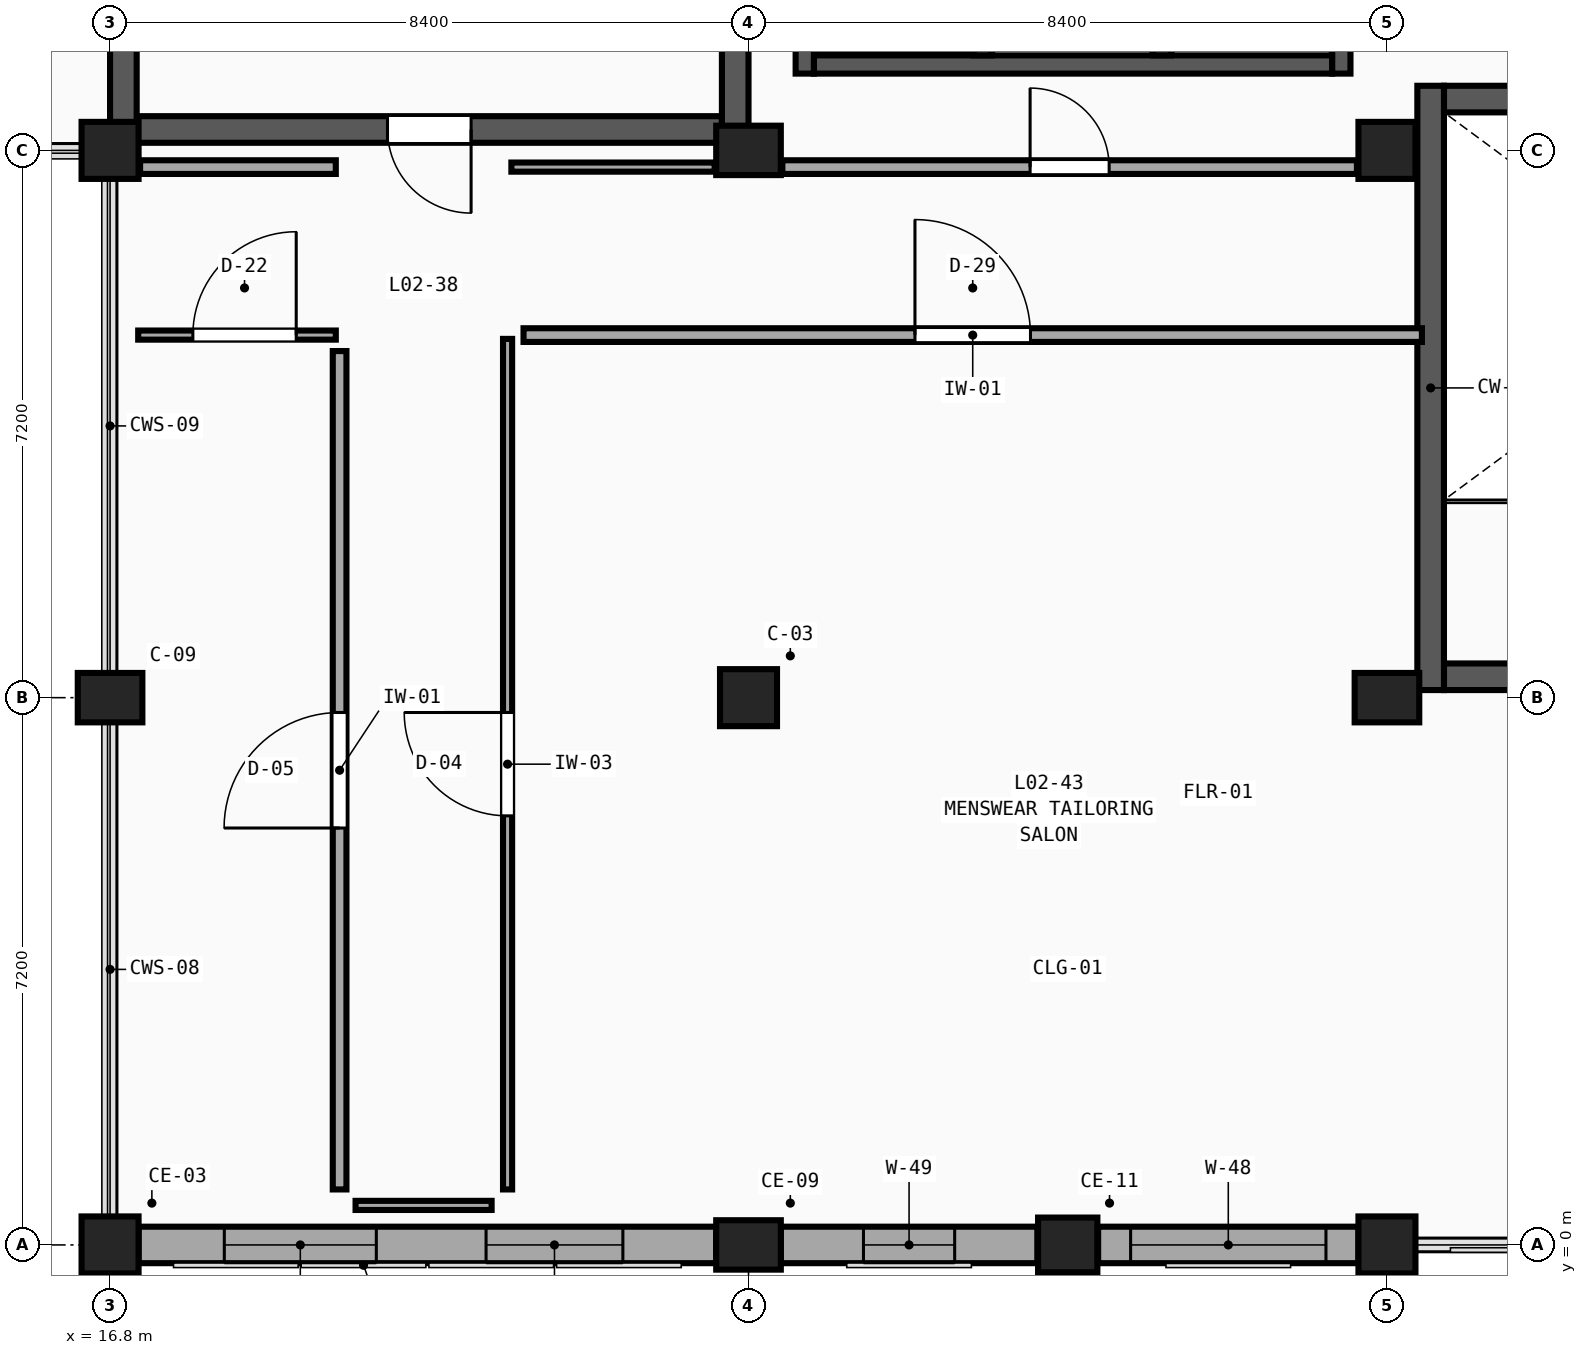
"""IFC4 building model, lengths in metres.
Left out: names, types, materials, properties, quantities, classifications, styles, units other than length and angle.
Written with IfcOpenShell. Run it as: python <this file> out.ifc"""

import sys

from ifc_helpers import new_model, si_unit, direction, frame, frame_2d, origin, origin_2d, place, context, subcontext, project, spatial, rectangle, extrude, element, fill, save


model = new_model("IFC4")
c1 = context("Model", 3, precision=1e-05, world=origin(), true_north=direction((0.0, 1.0)))
c2 = subcontext(c1, "Body", "Model", "MODEL_VIEW")
j1 = project(units=[si_unit("LENGTHUNIT", "METRE"), si_unit("PLANEANGLEUNIT", "RADIAN")], contexts=[c1])
p1 = place(None, origin())
s1 = spatial("IfcSite", under=j1, at=p1, CompositionType="ELEMENT")
p2 = place(p1, origin())
s2 = spatial("IfcBuilding", under=s1, at=p2, CompositionType="ELEMENT")
p3 = place(p2, frame((0.0, 0.0, 9.9)))
s3 = spatial("IfcBuildingStorey", under=s2, at=p3, CompositionType="ELEMENT", Elevation=9.9)
p4 = place(p3, frame((16.8, 0.0, 0.0), z_axis=(0.0, 0.0, 1.0), x_axis=(1.0, 0.0, 0.0)))
e1 = element("IfcColumn", 1, at=p4, inside=s3, PredefinedType="COLUMN", context=c2, shape_type="SweptSolid", body=[
    extrude(rectangle(XDim=0.75, YDim=0.75, at=origin_2d()), origin(), (0.0, 0.0, 1.0), 4.5),
])
p5 = place(p3, frame((16.8, 7.2, 0.0), z_axis=(0.0, 0.0, 1.0), x_axis=(1.0, 0.0, 0.0)))
e2 = element("IfcColumn", 2, at=p5, inside=s3, PredefinedType="COLUMN", context=c2, shape_type="SweptSolid", body=[
    extrude(rectangle(XDim=0.85, YDim=0.65, at=origin_2d()), origin(), (0.0, 0.0, 1.0), 4.5),
])
p6 = place(p3, frame((16.8, 14.4, 0.0), z_axis=(0.0, 0.0, 1.0), x_axis=(1.0, 0.0, 0.0)))
e3 = element("IfcColumn", 3, at=p6, inside=s3, PredefinedType="COLUMN", context=c2, shape_type="SweptSolid", body=[
    extrude(rectangle(XDim=0.75, YDim=0.75, at=origin_2d()), origin(), (0.0, 0.0, 1.0), 4.5),
])
p7 = place(p3, frame((25.2, 0.0, 0.0), z_axis=(0.0, 0.0, 1.0), x_axis=(1.0, 0.0, 0.0)))
e4 = element("IfcColumn", 4, at=p7, inside=s3, PredefinedType="COLUMN", context=c2, shape_type="SweptSolid", body=[
    extrude(rectangle(XDim=0.85, YDim=0.65, at=origin_2d()), origin(), (0.0, 0.0, 1.0), 4.5),
])
p8 = place(p3, frame((25.2, 7.2, 0.0), z_axis=(0.0, 0.0, 1.0), x_axis=(1.0, 0.0, 0.0)))
e5 = element("IfcColumn", 5, at=p8, inside=s3, PredefinedType="COLUMN", context=c2, shape_type="SweptSolid", body=[
    extrude(rectangle(XDim=0.75, YDim=0.75, at=origin_2d()), origin(), (0.0, 0.0, 1.0), 4.5),
])
p9 = place(p3, frame((25.2, 14.4, 0.0), z_axis=(0.0, 0.0, 1.0), x_axis=(1.0, 0.0, 0.0)))
e6 = element("IfcColumn", 6, at=p9, inside=s3, PredefinedType="COLUMN", context=c2, shape_type="SweptSolid", body=[
    extrude(rectangle(XDim=0.85, YDim=0.65, at=origin_2d()), origin(), (0.0, 0.0, 1.0), 4.5),
])
p10 = place(p3, frame((33.6, 0.0, 0.0), z_axis=(0.0, 0.0, 1.0), x_axis=(1.0, 0.0, 0.0)))
e7 = element("IfcColumn", 7, at=p10, inside=s3, PredefinedType="COLUMN", context=c2, shape_type="SweptSolid", body=[
    extrude(rectangle(XDim=0.75, YDim=0.75, at=origin_2d()), origin(), (0.0, 0.0, 1.0), 4.5),
])
p11 = place(p3, frame((33.6, 7.2, 0.0), z_axis=(0.0, 0.0, 1.0), x_axis=(1.0, 0.0, 0.0)))
e8 = element("IfcColumn", 8, at=p11, inside=s3, PredefinedType="COLUMN", context=c2, shape_type="SweptSolid", body=[
    extrude(rectangle(XDim=0.85, YDim=0.65, at=origin_2d()), origin(), (0.0, 0.0, 1.0), 4.5),
])
p12 = place(p3, frame((33.6, 14.4, 0.0), z_axis=(0.0, 0.0, 1.0), x_axis=(1.0, 0.0, 0.0)))
e9 = element("IfcColumn", 9, at=p12, inside=s3, PredefinedType="COLUMN", context=c2, shape_type="SweptSolid", body=[
    extrude(rectangle(XDim=0.75, YDim=0.75, at=origin_2d()), origin(), (0.0, 0.0, 1.0), 4.5),
])
p13 = place(p3, frame((29.4, 0.0, 0.0), z_axis=(0.0, 0.0, 1.0), x_axis=(1.0, 0.0, 0.0)))
e10 = element("IfcColumn", 10, at=p13, inside=s3, PredefinedType="PILASTER", context=c2, shape_type="SweptSolid", body=[
    extrude(rectangle(XDim=0.78, YDim=0.72, at=origin_2d()), origin(), (0.0, 0.0, 1.0), 4.5),
])
p14 = place(p3, frame((24.775, 0.0, 0.0), z_axis=(0.0, 0.0, 1.0), x_axis=(-1.0, 0.0, 0.0)))
e11 = element("IfcWall", 11, at=p14, inside=s3, PredefinedType="SOLIDWALL", context=c2, shape_type="SweptSolid", body=[
    extrude(rectangle(XDim=7.6, YDim=0.48, at=frame_2d((3.8, 0.0))), origin(), (0.0, 0.0, 1.0), 3.63),
])
p15 = place(p14, frame((1.228, 0.0, 0.75)))
e12 = element("IfcOpeningElement", 12, at=p15, cuts=e11, PredefinedType="OPENING", context=c2, shape_type="SweptSolid", body=[
    extrude(rectangle(XDim=1.8, YDim=2.73, at=frame_2d((0.9, 1.365))), frame((0.0, 0.26, 0.0), z_axis=(0.0, -1.0, 0.0), x_axis=(1.0, 0.0, 0.0)), (0.0, 0.0, 1.0), 0.52),
])
p16 = place(p14, frame((4.472, 0.0, 0.75)))
e13 = element("IfcOpeningElement", 13, at=p16, cuts=e11, PredefinedType="OPENING", context=c2, shape_type="SweptSolid", body=[
    extrude(rectangle(XDim=2.0, YDim=2.73, at=frame_2d((1.0, 1.365))), frame((0.0, 0.26, 0.0), z_axis=(0.0, -1.0, 0.0), x_axis=(1.0, 0.0, 0.0)), (0.0, 0.0, 1.0), 0.52),
])
p17 = place(p3, frame((33.225, 0.0, 0.0), z_axis=(0.0, 0.0, 1.0), x_axis=(-1.0, 0.0, 0.0)))
e14 = element("IfcWall", 14, at=p17, inside=s3, PredefinedType="SOLIDWALL", context=c2, shape_type="SweptSolid", body=[
    extrude(rectangle(XDim=3.425, YDim=0.48, at=frame_2d((1.712, 0.0))), origin(), (0.0, 0.0, 1.0), 3.63),
])
p18 = place(p17, frame((0.427, 0.0, 0.75)))
e15 = element("IfcOpeningElement", 15, at=p18, cuts=e14, PredefinedType="OPENING", context=c2, shape_type="SweptSolid", body=[
    extrude(rectangle(XDim=2.57, YDim=2.73, at=frame_2d((1.285, 1.365))), frame((0.0, 0.26, 0.0), z_axis=(0.0, -1.0, 0.0), x_axis=(1.0, 0.0, 0.0)), (0.0, 0.0, 1.0), 0.52),
])
p19 = place(p3, frame((29.0, 0.0, 0.0), z_axis=(0.0, 0.0, 1.0), x_axis=(-1.0, 0.0, 0.0)))
e16 = element("IfcWall", 16, at=p19, inside=s3, PredefinedType="SOLIDWALL", context=c2, shape_type="SweptSolid", body=[
    extrude(rectangle(XDim=3.375, YDim=0.48, at=frame_2d((1.688, 0.0))), origin(), (0.0, 0.0, 1.0), 3.63),
])
p20 = place(p19, frame((1.087, 0.0, 0.75)))
e17 = element("IfcOpeningElement", 17, at=p20, cuts=e16, PredefinedType="OPENING", context=c2, shape_type="SweptSolid", body=[
    extrude(rectangle(XDim=1.2, YDim=2.73, at=frame_2d((0.6, 1.365))), frame((0.0, 0.26, 0.0), z_axis=(0.0, -1.0, 0.0), x_axis=(1.0, 0.0, 0.0)), (0.0, 0.0, 1.0), 0.52),
])
p21 = place(p3, frame((24.85, 14.675, 0.0), z_axis=(0.0, 0.0, 1.0), x_axis=(-1.0, 0.0, 0.0)))
e18 = element("IfcWall", 18, at=p21, inside=s3, PredefinedType="SHEAR", context=c2, shape_type="SweptSolid", body=[
    extrude(rectangle(XDim=7.7, YDim=0.35, at=frame_2d((3.85, 0.0))), origin(), (0.0, 0.0, 1.0), 4.5),
])
p22 = place(p21, frame((3.3, 0.0, 0.0)))
e19 = element("IfcOpeningElement", 19, at=p22, cuts=e18, PredefinedType="OPENING", context=c2, shape_type="SweptSolid", body=[
    extrude(rectangle(XDim=1.1, YDim=2.2, at=frame_2d((0.55, 1.1))), frame((0.0, 0.195, 0.0), z_axis=(0.0, -1.0, 0.0), x_axis=(1.0, 0.0, 0.0)), (0.0, 0.0, 1.0), 0.39),
])
for number, where, z_axis, x_axis in (
    (20, (16.975, 22.85, 0.0), (0.0, 0.0, 1.0), (0.0, -1.0, 0.0)),
    (21, (25.025, 14.5, 0.0), (0.0, 0.0, 1.0), (0.0, 1.0, 0.0)),
):
    element("IfcWall", number, at=place(p3, frame(where, z_axis=z_axis, x_axis=x_axis)), inside=s3, PredefinedType="SHEAR", context=c2, shape_type="SweptSolid", body=[
        extrude(rectangle(XDim=8.35, YDim=0.35, at=frame_2d((4.175, 0.0))), origin(), (0.0, 0.0, 1.0), 4.5),
    ])
p23 = place(p3, frame((41.25, 7.475, 0.0), z_axis=(0.0, 0.0, 1.0), x_axis=(-1.0, 0.0, 0.0)))
e22 = element("IfcWall", 22, at=p23, inside=s3, PredefinedType="SHEAR", context=c2, shape_type="SweptSolid", body=[
    extrude(rectangle(XDim=6.9, YDim=0.35, at=frame_2d((3.45, 0.0))), origin(), (0.0, 0.0, 1.0), 4.5),
])
p24 = place(p23, frame((2.9, 0.0, 0.0)))
e23 = element("IfcOpeningElement", 23, at=p24, cuts=e22, PredefinedType="OPENING", context=c2, shape_type="SweptSolid", body=[
    extrude(rectangle(XDim=1.1, YDim=2.2, at=frame_2d((0.55, 1.1))), frame((0.0, 0.195, 0.0), z_axis=(0.0, -1.0, 0.0), x_axis=(1.0, 0.0, 0.0)), (0.0, 0.0, 1.0), 0.39),
])
p25 = place(p3, frame((34.35, 15.075, 0.0), z_axis=(0.0, 0.0, 1.0), x_axis=(1.0, 0.0, 0.0)))
e24 = element("IfcWall", 24, at=p25, inside=s3, PredefinedType="SHEAR", context=c2, shape_type="SweptSolid", body=[
    extrude(rectangle(XDim=6.9, YDim=0.35, at=frame_2d((3.45, 0.0))), origin(), (0.0, 0.0, 1.0), 4.5),
])
p26 = place(p3, frame((34.175, 15.25, 0.0), z_axis=(0.0, 0.0, 1.0), x_axis=(0.0, -1.0, 0.0)))
e25 = element("IfcWall", 25, at=p26, inside=s3, PredefinedType="SHEAR", context=c2, shape_type="SweptSolid", body=[
    extrude(rectangle(XDim=7.95, YDim=0.35, at=frame_2d((3.975, 0.0))), origin(), (0.0, 0.0, 1.0), 4.5),
])
p27 = place(p3, frame((26.06, 15.53, 0.0), z_axis=(0.0, 0.0, 1.0), x_axis=(1.0, 0.0, 0.0)))
e26 = element("IfcWall", 26, at=p27, inside=s3, PredefinedType="SHEAR", context=c2, shape_type="SweptSolid", body=[
    extrude(rectangle(XDim=6.82, YDim=0.24, at=frame_2d((3.41, 0.0))), origin(), (0.0, 0.0, 1.0), 4.18),
])
for number, where, z_axis, x_axis in (
    (27, (25.94, 18.39, 0.0), (0.0, 0.0, 1.0), (0.0, -1.0, 0.0)),
    (28, (33.0, 15.41, 0.0), (0.0, 0.0, 1.0), (0.0, 1.0, 0.0)),
):
    element("IfcWall", number, at=place(p3, frame(where, z_axis=z_axis, x_axis=x_axis)), inside=s3, PredefinedType="SHEAR", context=c2, shape_type="SweptSolid", body=[
        extrude(rectangle(XDim=2.98, YDim=0.24, at=frame_2d((1.49, 0.0))), origin(), (0.0, 0.0, 1.0), 4.18),
    ])
for number, where, z_axis, x_axis in (
    (29, (28.28, 15.65, 0.0), (0.0, 0.0, 1.0), (0.0, 1.0, 0.0)),
    (30, (30.64, 15.65, 0.0), (0.0, 0.0, 1.0), (0.0, 1.0, 0.0)),
):
    element("IfcWall", number, at=place(p3, frame(where, z_axis=z_axis, x_axis=x_axis)), inside=s3, PredefinedType="SHEAR", context=c2, shape_type="SweptSolid", body=[
        extrude(rectangle(XDim=2.5, YDim=0.24, at=frame_2d((1.25, 0.0))), origin(), (0.0, 0.0, 1.0), 4.18),
    ])
p28 = place(p3, frame((22.08, 14.18, 0.0), z_axis=(0.0, 0.0, 1.0), x_axis=(1.0, 0.0, 0.0)))
e31 = element("IfcWall", 31, at=p28, inside=s3, PredefinedType="PARTITIONING", context=c2, shape_type="SweptSolid", body=[
    extrude(rectangle(XDim=2.675, YDim=0.12, at=frame_2d((1.337, 0.0))), origin(), (0.0, 0.0, 1.0), 3.73),
])
p29 = place(p3, frame((25.645, 14.18, 0.0), z_axis=(0.0, 0.0, 1.0), x_axis=(1.0, 0.0, 0.0)))
e32 = element("IfcWall", 32, at=p29, inside=s3, PredefinedType="PARTITIONING", context=c2, shape_type="SweptSolid", body=[
    extrude(rectangle(XDim=7.56, YDim=0.18, at=frame_2d((3.78, 0.0))), origin(), (0.0, 0.0, 1.0), 3.73),
])
p30 = place(p29, frame((3.26, 0.0, 0.0)))
e33 = element("IfcOpeningElement", 33, at=p30, cuts=e32, PredefinedType="OPENING", context=c2, shape_type="SweptSolid", body=[
    extrude(rectangle(XDim=1.04, YDim=2.37, at=frame_2d((0.52, 1.185))), frame((0.0, 0.11, 0.0), z_axis=(0.0, -1.0, 0.0), x_axis=(1.0, 0.0, 0.0)), (0.0, 0.0, 1.0), 0.22),
])
p31 = place(p3, frame((22.24, 11.97, 0.0), z_axis=(0.0, 0.0, 1.0), x_axis=(1.0, 0.0, 0.0)))
e34 = element("IfcWall", 34, at=p31, inside=s3, PredefinedType="PARTITIONING", context=c2, shape_type="SweptSolid", body=[
    extrude(rectangle(XDim=11.82, YDim=0.18, at=frame_2d((5.91, 0.0))), origin(), (0.0, 0.0, 1.0), 4.18),
])
p32 = place(p31, frame((5.15, 0.0, 0.0)))
e35 = element("IfcOpeningElement", 35, at=p32, cuts=e34, PredefinedType="OPENING", context=c2, shape_type="SweptSolid", body=[
    extrude(rectangle(XDim=1.52, YDim=2.37, at=frame_2d((0.76, 1.185))), frame((0.0, 0.11, 0.0), z_axis=(0.0, -1.0, 0.0), x_axis=(1.0, 0.0, 0.0)), (0.0, 0.0, 1.0), 0.22),
])
p33 = place(p3, frame((22.03, 0.73, 0.0), z_axis=(0.0, 0.0, 1.0), x_axis=(0.0, 1.0, 0.0)))
e36 = element("IfcWall", 36, at=p33, inside=s3, PredefinedType="PARTITIONING", context=c2, shape_type="SweptSolid", body=[
    extrude(rectangle(XDim=11.19, YDim=0.12, at=frame_2d((5.595, 0.0))), origin(), (0.0, 0.0, 1.0), 4.18),
])
p34 = place(p33, frame((4.915, 0.0, 0.0)))
e37 = element("IfcOpeningElement", 37, at=p34, cuts=e36, PredefinedType="OPENING", context=c2, shape_type="SweptSolid", body=[
    extrude(rectangle(XDim=1.36, YDim=2.05, at=frame_2d((0.68, 1.025))), frame((0.0, 0.08, 0.0), z_axis=(0.0, -1.0, 0.0), x_axis=(1.0, 0.0, 0.0)), (0.0, 0.0, 1.0), 0.16),
])
p35 = place(p3, frame((19.82, 0.73, 0.0), z_axis=(0.0, 0.0, 1.0), x_axis=(0.0, 1.0, 0.0)))
e38 = element("IfcWall", 38, at=p35, inside=s3, PredefinedType="PARTITIONING", context=c2, shape_type="SweptSolid", body=[
    extrude(rectangle(XDim=11.03, YDim=0.18, at=frame_2d((5.515, 0.0))), origin(), (0.0, 0.0, 1.0), 4.18),
])
p36 = place(p35, frame((4.755, 0.0, 0.0)))
e39 = element("IfcOpeningElement", 39, at=p36, cuts=e38, PredefinedType="OPENING", context=c2, shape_type="SweptSolid", body=[
    extrude(rectangle(XDim=1.52, YDim=2.05, at=frame_2d((0.76, 1.025))), frame((0.0, 0.11, 0.0), z_axis=(0.0, -1.0, 0.0), x_axis=(1.0, 0.0, 0.0)), (0.0, 0.0, 1.0), 0.22),
])
p37 = place(p3, frame((17.17, 11.97, 0.0), z_axis=(0.0, 0.0, 1.0), x_axis=(1.0, 0.0, 0.0)))
e40 = element("IfcWall", 40, at=p37, inside=s3, PredefinedType="PARTITIONING", context=c2, shape_type="SweptSolid", body=[
    extrude(rectangle(XDim=2.6, YDim=0.12, at=frame_2d((1.3, 0.0))), origin(), (0.0, 0.0, 1.0), 4.18),
])
p38 = place(p37, frame((0.719, 0.0, 0.0)))
e41 = element("IfcOpeningElement", 41, at=p38, cuts=e40, PredefinedType="OPENING", context=c2, shape_type="SweptSolid", body=[
    extrude(rectangle(XDim=1.36, YDim=2.29, at=frame_2d((0.68, 1.145))), frame((0.0, 0.08, 0.0), z_axis=(0.0, -1.0, 0.0), x_axis=(1.0, 0.0, 0.0)), (0.0, 0.0, 1.0), 0.16),
])
p39 = place(p3, frame((17.195, 14.18, 0.0), z_axis=(0.0, 0.0, 1.0), x_axis=(1.0, 0.0, 0.0)))
e42 = element("IfcWall", 42, at=p39, inside=s3, PredefinedType="PARTITIONING", context=c2, shape_type="SweptSolid", body=[
    extrude(rectangle(XDim=2.575, YDim=0.18, at=frame_2d((1.288, 0.0))), origin(), (0.0, 0.0, 1.0), 3.73),
])
p40 = place(p3, frame((20.03, 0.52, 0.0), z_axis=(0.0, 0.0, 1.0), x_axis=(1.0, 0.0, 0.0)))
e43 = element("IfcWall", 43, at=p40, inside=s3, PredefinedType="PARTITIONING", context=c2, shape_type="SweptSolid", body=[
    extrude(rectangle(XDim=1.79, YDim=0.12, at=frame_2d((0.895, 0.0))), origin(), (0.0, 0.0, 1.0), 3.63),
])
p41 = place(p15, origin())
e44 = element("IfcWindow", 44, at=p41, inside=s3, PartitioningType="DOUBLE_PANEL_VERTICAL", PredefinedType="WINDOW", context=c2, shape_type="SweptSolid", body=[
    extrude(rectangle(XDim=1.8, YDim=2.73, at=frame_2d((0.9, 1.365))), frame((0.0, 0.03, 0.0), z_axis=(0.0, -1.0, 0.0), x_axis=(1.0, 0.0, 0.0)), (0.0, 0.0, 1.0), 0.06),
])
fill(e12, e44)
p42 = place(p16, origin())
e45 = element("IfcWindow", 45, at=p42, inside=s3, PartitioningType="TRIPLE_PANEL_VERTICAL", PredefinedType="WINDOW", context=c2, shape_type="SweptSolid", body=[
    extrude(rectangle(XDim=2.0, YDim=2.73, at=frame_2d((1.0, 1.365))), frame((0.0, 0.03, 0.0), z_axis=(0.0, -1.0, 0.0), x_axis=(1.0, 0.0, 0.0)), (0.0, 0.0, 1.0), 0.06),
])
fill(e13, e45)
p43 = place(p18, origin())
e46 = element("IfcWindow", 46, at=p43, inside=s3, PartitioningType="TRIPLE_PANEL_VERTICAL", PredefinedType="WINDOW", context=c2, shape_type="SweptSolid", body=[
    extrude(rectangle(XDim=2.57, YDim=2.73, at=frame_2d((1.285, 1.365))), frame((0.0, 0.03, 0.0), z_axis=(0.0, -1.0, 0.0), x_axis=(1.0, 0.0, 0.0)), (0.0, 0.0, 1.0), 0.06),
])
fill(e15, e46)
p44 = place(p20, origin())
e47 = element("IfcWindow", 47, at=p44, inside=s3, PartitioningType="SINGLE_PANEL", PredefinedType="WINDOW", context=c2, shape_type="SweptSolid", body=[
    extrude(rectangle(XDim=1.2, YDim=2.73, at=frame_2d((0.6, 1.365))), frame((0.0, 0.03, 0.0), z_axis=(0.0, -1.0, 0.0), x_axis=(1.0, 0.0, 0.0)), (0.0, 0.0, 1.0), 0.06),
])
fill(e17, e47)
p45 = place(p22, origin())
e48 = element("IfcDoor", 48, at=p45, inside=s3, OperationType="SINGLE_SWING_LEFT", PredefinedType="DOOR", context=c2, shape_type="SweptSolid", body=[
    extrude(rectangle(XDim=1.1, YDim=2.2, at=frame_2d((0.55, 1.1))), frame((0.0, 0.025, 0.0), z_axis=(0.0, -1.0, 0.0), x_axis=(1.0, 0.0, 0.0)), (0.0, 0.0, 1.0), 0.05),
])
fill(e19, e48)
p46 = place(p30, origin())
e49 = element("IfcDoor", 49, at=p46, inside=s3, OperationType="SINGLE_SWING_LEFT", PredefinedType="DOOR", context=c2, shape_type="SweptSolid", body=[
    extrude(rectangle(XDim=1.04, YDim=2.37, at=frame_2d((0.52, 1.185))), frame((0.0, 0.025, 0.0), z_axis=(0.0, -1.0, 0.0), x_axis=(1.0, 0.0, 0.0)), (0.0, 0.0, 1.0), 0.05),
])
fill(e33, e49)
p47 = place(p32, origin())
e50 = element("IfcDoor", 50, at=p47, inside=s3, OperationType="SINGLE_SWING_LEFT", PredefinedType="DOOR", context=c2, shape_type="SweptSolid", body=[
    extrude(rectangle(XDim=1.52, YDim=2.37, at=frame_2d((0.76, 1.185))), frame((0.0, 0.025, 0.0), z_axis=(0.0, -1.0, 0.0), x_axis=(1.0, 0.0, 0.0)), (0.0, 0.0, 1.0), 0.05),
])
fill(e35, e50)
p48 = place(p34, origin())
e51 = element("IfcDoor", 51, at=p48, inside=s3, OperationType="SINGLE_SWING_RIGHT", PredefinedType="DOOR", context=c2, shape_type="SweptSolid", body=[
    extrude(rectangle(XDim=1.36, YDim=2.05, at=frame_2d((0.68, 1.025))), frame((0.0, 0.025, 0.0), z_axis=(0.0, -1.0, 0.0), x_axis=(1.0, 0.0, 0.0)), (0.0, 0.0, 1.0), 0.05),
])
fill(e37, e51)
p49 = place(p36, origin())
e52 = element("IfcDoor", 52, at=p49, inside=s3, OperationType="SINGLE_SWING_LEFT", PredefinedType="DOOR", context=c2, shape_type="SweptSolid", body=[
    extrude(rectangle(XDim=1.52, YDim=2.05, at=frame_2d((0.76, 1.025))), frame((0.0, 0.025, 0.0), z_axis=(0.0, -1.0, 0.0), x_axis=(1.0, 0.0, 0.0)), (0.0, 0.0, 1.0), 0.05),
])
fill(e39, e52)
p50 = place(p38, origin())
e53 = element("IfcDoor", 53, at=p50, inside=s3, OperationType="SINGLE_SWING_RIGHT", PredefinedType="DOOR", context=c2, shape_type="SweptSolid", body=[
    extrude(rectangle(XDim=1.36, YDim=2.29, at=frame_2d((0.68, 1.145))), frame((0.0, 0.025, 0.0), z_axis=(0.0, -1.0, 0.0), x_axis=(1.0, 0.0, 0.0)), (0.0, 0.0, 1.0), 0.05),
])
fill(e41, e53)
save(model, sys.argv[1])
